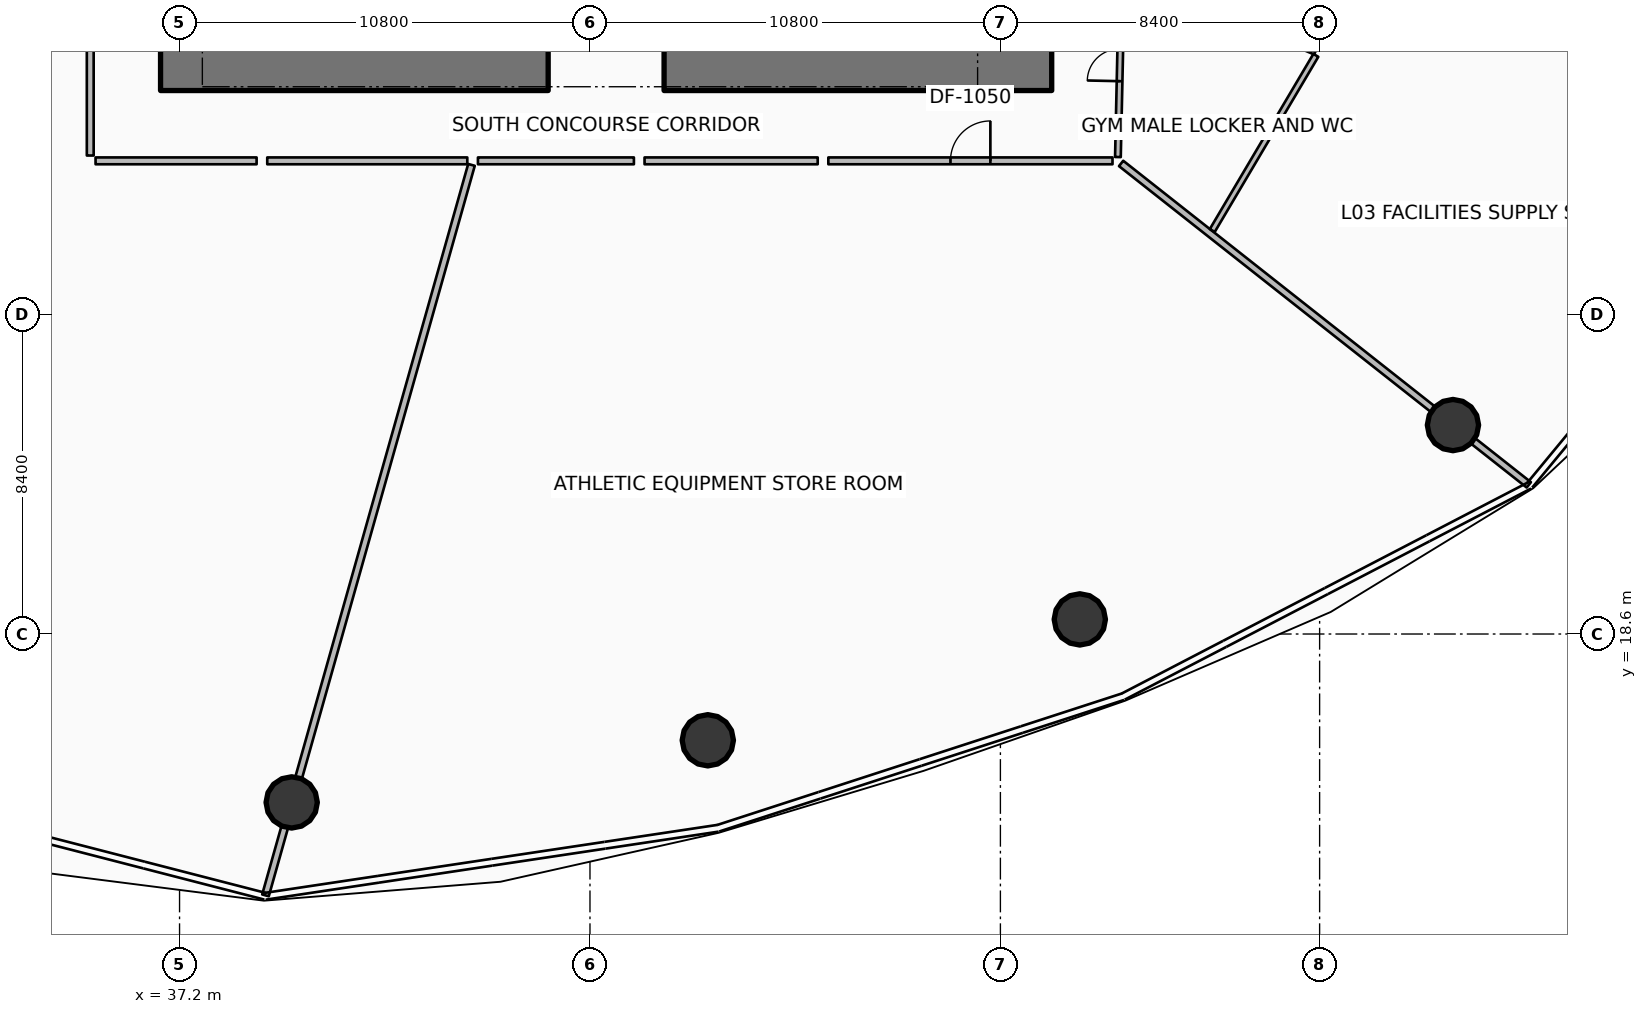
"""IFC4 building model, lengths in metres.
Left out: names, types, materials, properties, quantities, classifications, styles, units other than length and angle.
Written with IfcOpenShell. Run it as: python <this file> out.ifc"""

import sys

from ifc_helpers import new_model, si_unit, direction, frame, frame_2d, origin, origin_2d, place, context, subcontext, project, spatial, rectangle, circle, extrude, element, fill, save


model = new_model("IFC4")
c1 = context("Model", 3, precision=1e-05, world=origin(), true_north=direction((0.0, 1.0)))
c2 = subcontext(c1, "Body", "Model", "MODEL_VIEW")
j1 = project(units=[si_unit("LENGTHUNIT", "METRE"), si_unit("PLANEANGLEUNIT", "RADIAN")], contexts=[c1])
p1 = place(None, origin())
s1 = spatial("IfcSite", under=j1, at=p1, CompositionType="ELEMENT")
p2 = place(p1, origin())
s2 = spatial("IfcBuilding", under=s1, at=p2, CompositionType="ELEMENT")
p3 = place(p2, frame((0.0, 0.0, 16.8)))
s3 = spatial("IfcBuildingStorey", under=s2, at=p3, CompositionType="ELEMENT", Elevation=16.8)
for number, where, z_axis, x_axis in (
    (1, (36.7, 33.45, 0.0), (0.0, 0.0, 1.0), (1.0, 0.0, 0.0)),
    (2, (49.95, 33.45, 0.0), (0.0, 0.0, 1.0), (1.0, 0.0, 0.0)),
):
    element("IfcWall", number, at=place(p3, frame(where, z_axis=z_axis, x_axis=x_axis)), inside=s3, PredefinedType="SHEAR", context=c2, shape_type="SweptSolid", body=[
        extrude(rectangle(XDim=10.2, YDim=1.1, at=frame_2d((5.1, 0.0))), origin(), (0.0, 0.0, 1.0), 4.8),
    ])
for number, where, z_axis, x_axis in (
    (3, (40.151, 14.169, 0.0), (0.0, 0.0, 1.0), (1.0, 0.0, 0.0)),
    (4, (51.101, 15.804, 0.0), (0.0, 0.0, 1.0), (1.0, 0.0, 0.0)),
    (5, (60.889, 18.984, 0.0), (0.0, 0.0, 1.0), (1.0, 0.0, 0.0)),
    (6, (70.709, 24.098, 0.0), (0.0, 0.0, 1.0), (1.0, 0.0, 0.0)),
):
    element("IfcColumn", number, at=place(p3, frame(where, z_axis=z_axis, x_axis=x_axis)), inside=s3, PredefinedType="COLUMN", context=c2, shape_type="SweptSolid", body=[
        extrude(circle(Radius=0.675, at=origin_2d()), origin(), (0.0, 0.0, 1.0), 4.4),
    ])
p4 = place(p3, frame((34.85, 34.496, 0.0), z_axis=(0.0, 0.0, 1.0), x_axis=(0.0, -1.0, 0.0)))
e7 = element("IfcWall", 7, at=p4, inside=s3, PredefinedType="PARTITIONING", context=c2, shape_type="SweptSolid", body=[
    extrude(rectangle(XDim=3.306, YDim=0.18, at=frame_2d((1.653, 0.0))), origin(), (0.0, 0.0, 1.0), 3.613),
])
p5 = place(p3, frame((34.99, 31.05, 0.0), z_axis=(0.0, 0.0, 1.0), x_axis=(1.0, 0.0, 0.0)))
e8 = element("IfcWall", 8, at=p5, inside=s3, PredefinedType="PARTITIONING", context=c2, shape_type="SweptSolid", body=[
    extrude(rectangle(XDim=4.238, YDim=0.18, at=frame_2d((2.119, 0.0))), origin(), (0.0, 0.0, 1.0), 3.613),
])
p6 = place(p3, frame((39.508, 31.05, 0.0), z_axis=(0.0, 0.0, 1.0), x_axis=(1.0, 0.0, 0.0)))
e9 = element("IfcWall", 9, at=p6, inside=s3, PredefinedType="PARTITIONING", context=c2, shape_type="SweptSolid", body=[
    extrude(rectangle(XDim=5.264, YDim=0.18, at=frame_2d((2.632, 0.0))), origin(), (0.0, 0.0, 1.0), 3.613),
])
p7 = place(p3, frame((44.882, 30.944, 0.0), z_axis=(0.0, 0.0, 1.0), x_axis=(-0.271438678553, -0.962455736014, 0.0)))
e10 = element("IfcWall", 10, at=p7, inside=s3, PredefinedType="PARTITIONING", context=c2, shape_type="SweptSolid", body=[
    extrude(rectangle(XDim=19.971, YDim=0.18, at=frame_2d((9.985, 0.0))), origin(), (0.0, 0.0, 1.0), 3.613),
])
p8 = place(p3, frame((45.052, 31.05, 0.0), z_axis=(0.0, 0.0, 1.0), x_axis=(1.0, 0.0, 0.0)))
e11 = element("IfcWall", 11, at=p8, inside=s3, PredefinedType="PARTITIONING", context=c2, shape_type="SweptSolid", body=[
    extrude(rectangle(XDim=4.104, YDim=0.18, at=frame_2d((2.052, 0.0))), origin(), (0.0, 0.0, 1.0), 3.613),
])
p9 = place(p3, frame((49.436, 31.05, 0.0), z_axis=(0.0, 0.0, 1.0), x_axis=(1.0, 0.0, 0.0)))
e12 = element("IfcWall", 12, at=p9, inside=s3, PredefinedType="PARTITIONING", context=c2, shape_type="SweptSolid", body=[
    extrude(rectangle(XDim=4.556, YDim=0.18, at=frame_2d((2.278, 0.0))), origin(), (0.0, 0.0, 1.0), 3.613),
])
p10 = place(p3, frame((54.272, 31.05, 0.0), z_axis=(0.0, 0.0, 1.0), x_axis=(1.0, 0.0, 0.0)))
e13 = element("IfcWall", 13, at=p10, inside=s3, PredefinedType="PARTITIONING", context=c2, shape_type="SweptSolid", body=[
    extrude(rectangle(XDim=7.478, YDim=0.18, at=frame_2d((3.739, 0.0))), origin(), (0.0, 0.0, 1.0), 3.613),
])
p11 = place(p10, frame((3.214, 0.0, 0.0)))
e14 = element("IfcOpeningElement", 14, at=p11, cuts=e13, PredefinedType="OPENING", context=c2, shape_type="SweptSolid", body=[
    extrude(rectangle(XDim=1.05, YDim=2.1, at=frame_2d((0.525, 1.05))), frame((0.0, 0.1, 0.0), z_axis=(0.0, -1.0, 0.0), x_axis=(1.0, 0.0, 0.0)), (0.0, 0.0, 1.0), 0.2),
])
p12 = place(p3, frame((61.976, 30.982, 0.0), z_axis=(0.0, 0.0, 1.0), x_axis=(0.785315783489, -0.619095404766, 0.0)))
e15 = element("IfcWall", 15, at=p12, inside=s3, PredefinedType="PARTITIONING", context=c2, shape_type="SweptSolid", body=[
    extrude(rectangle(XDim=13.661, YDim=0.18, at=frame_2d((6.831, 0.0))), origin(), (0.0, 0.0, 1.0), 3.613),
])
p13 = place(p3, frame((61.892, 31.15, 0.0), z_axis=(0.0, 0.0, 1.0), x_axis=(0.021928973177, 0.999759531155, 0.0)))
e16 = element("IfcWall", 16, at=p13, inside=s3, PredefinedType="PARTITIONING", context=c2, shape_type="SweptSolid", body=[
    extrude(rectangle(XDim=4.843, YDim=0.15, at=frame_2d((2.421, 0.0))), origin(), (0.0, 0.0, 1.0), 3.613),
])
p14 = place(p13, frame((1.997, 0.0, 0.0)))
e17 = element("IfcOpeningElement", 17, at=p14, cuts=e16, PredefinedType="OPENING", context=c2, shape_type="SweptSolid", body=[
    extrude(rectangle(XDim=0.85, YDim=2.06, at=frame_2d((0.425, 1.03))), frame((0.0, 0.085, 0.0), z_axis=(0.0, -1.0, 0.0), x_axis=(1.0, 0.0, 0.0)), (0.0, 0.0, 1.0), 0.17),
])
p15 = place(p3, frame((62.074, 36.041, 0.0), z_axis=(0.0, 0.0, 1.0), x_axis=(0.920841540816, -0.38993699069, 0.0)))
e18 = element("IfcWall", 18, at=p15, inside=s3, PredefinedType="PARTITIONING", context=c2, shape_type="SweptSolid", body=[
    extrude(rectangle(XDim=5.443, YDim=0.15, at=frame_2d((2.722, 0.0))), origin(), (0.0, 0.0, 1.0), 3.84),
])
p16 = place(p3, frame((64.375, 29.217, 0.0), z_axis=(0.0, 0.0, 1.0), x_axis=(0.509047270842, 0.860738564286, 0.0)))
e19 = element("IfcWall", 19, at=p16, inside=s3, PredefinedType="PARTITIONING", context=c2, shape_type="SweptSolid", body=[
    extrude(rectangle(XDim=5.354, YDim=0.15, at=frame_2d((2.677, 0.0))), origin(), (0.0, 0.0, 1.0), 3.613),
])
p17 = place(p3, frame((62.106, 38.022, 0.0), z_axis=(0.0, 0.0, 1.0), x_axis=(0.962455233657, -0.271440459782, 0.0)))
e20 = element("IfcWall", 20, at=p17, inside=s3, PredefinedType="PARTITIONING", context=c2, shape_type="SweptSolid", body=[
    extrude(rectangle(XDim=19.716, YDim=0.18, at=frame_2d((9.858, 0.0))), origin(), (0.0, 0.0, 1.0), 3.613),
])
p18 = place(p11, origin())
e21 = element("IfcDoor", 21, at=p18, inside=s3, OperationType="SINGLE_SWING_RIGHT", PredefinedType="DOOR", context=c2, shape_type="SweptSolid", body=[
    extrude(rectangle(XDim=1.05, YDim=2.1, at=frame_2d((0.525, 1.05))), frame((0.0, 0.025, 0.0), z_axis=(0.0, -1.0, 0.0), x_axis=(1.0, 0.0, 0.0)), (0.0, 0.0, 1.0), 0.05),
])
fill(e14, e21)
p19 = place(p14, origin())
e22 = element("IfcDoor", 22, at=p19, inside=s3, OperationType="SINGLE_SWING_LEFT", PredefinedType="DOOR", context=c2, shape_type="SweptSolid", body=[
    extrude(rectangle(XDim=0.85, YDim=2.06, at=frame_2d((0.425, 1.03))), frame((0.0, 0.025, 0.0), z_axis=(0.0, -1.0, 0.0), x_axis=(1.0, 0.0, 0.0)), (0.0, 0.0, 1.0), 0.05),
])
fill(e17, e22)
save(model, sys.argv[1])
